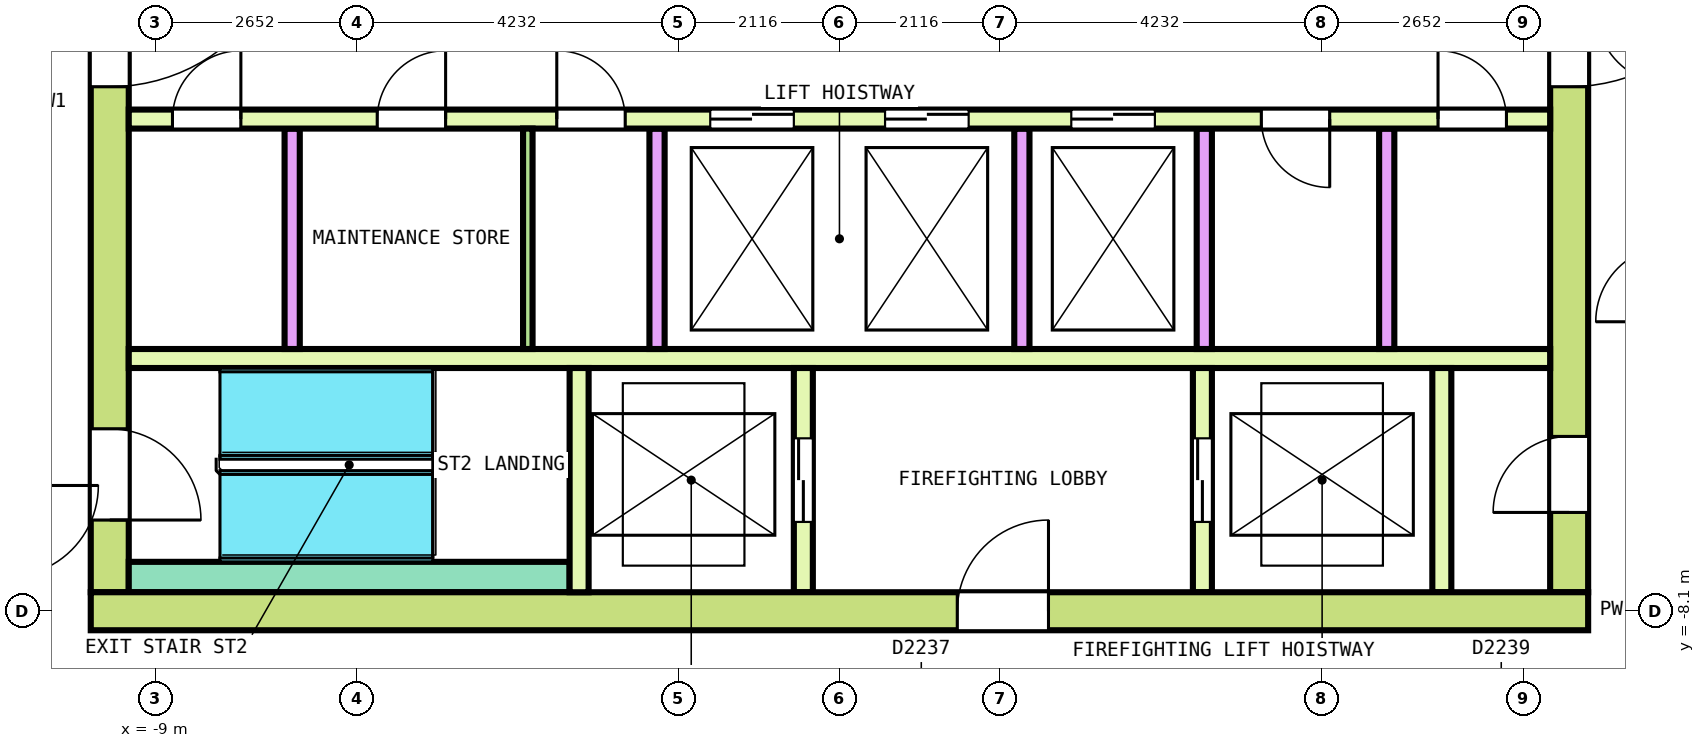
"""IFC4 building model, lengths in metres.
Left out: names, types, materials, properties, quantities, classifications, styles, units other than length and angle.
Written with IfcOpenShell. Run it as: python <this file> out.ifc"""

import sys

from ifc_helpers import new_model, si_unit, direction, frame, frame_2d, origin, place, context, subcontext, project, spatial, rectangle, extrude, element, fill, save


model = new_model("IFC4")
c1 = context("Model", 3, precision=1e-05, world=origin(), true_north=direction((0.0, 1.0)))
c2 = subcontext(c1, "Body", "Model", "MODEL_VIEW")
j1 = project(units=[si_unit("LENGTHUNIT", "METRE"), si_unit("PLANEANGLEUNIT", "RADIAN")], contexts=[c1])
p1 = place(None, origin())
s1 = spatial("IfcSite", under=j1, at=p1, CompositionType="ELEMENT")
p2 = place(p1, origin())
s2 = spatial("IfcBuilding", under=s1, at=p2, CompositionType="ELEMENT")
p3 = place(p2, frame((0.0, 0.0, 291.0)))
s3 = spatial("IfcBuildingStorey", under=s2, at=p3, CompositionType="ELEMENT", Elevation=291.0)
p4 = place(p3, frame((-9.85, -8.1, 0.0), z_axis=(0.0, 0.0, 1.0), x_axis=(1.0, 0.0, 0.0)))
e1 = element("IfcWall", 1, at=p4, inside=s3, PredefinedType="SHEAR", context=c2, shape_type="SweptSolid", body=[
    extrude(rectangle(XDim=19.7, YDim=0.5, at=frame_2d((9.85, 0.0))), origin(), (0.0, 0.0, 1.0), 3.7),
])
p5 = place(p4, frame((11.4, 0.0, 0.0)))
e2 = element("IfcOpeningElement", 2, at=p5, cuts=e1, PredefinedType="OPENING", context=c2, shape_type="SweptSolid", body=[
    extrude(rectangle(XDim=1.2, YDim=2.1, at=frame_2d((0.6, 1.05))), frame((0.0, 0.26, 0.0), z_axis=(0.0, -1.0, 0.0), x_axis=(1.0, 0.0, 0.0)), (0.0, 0.0, 1.0), 0.52),
])
p6 = place(p3, frame((-9.6, -7.85, 0.0), z_axis=(0.0, 0.0, 1.0), x_axis=(0.0, 1.0, 0.0)))
e3 = element("IfcWall", 3, at=p6, inside=s3, PredefinedType="SHEAR", context=c2, shape_type="SweptSolid", body=[
    extrude(rectangle(XDim=15.7, YDim=0.5, at=frame_2d((7.85, 0.0))), origin(), (0.0, 0.0, 1.0), 3.7),
])
p7 = place(p6, frame((6.65, 0.0, 0.0)))
e4 = element("IfcOpeningElement", 4, at=p7, cuts=e3, PredefinedType="OPENING", context=c2, shape_type="SweptSolid", body=[
    extrude(rectangle(XDim=2.4, YDim=2.1, at=frame_2d((1.2, 1.05))), frame((0.0, 0.26, 0.0), z_axis=(0.0, -1.0, 0.0), x_axis=(1.0, 0.0, 0.0)), (0.0, 0.0, 1.0), 0.52),
])
p8 = place(p6, frame((13.55, 0.0, 0.0)))
e5 = element("IfcOpeningElement", 5, at=p8, cuts=e3, PredefinedType="OPENING", context=c2, shape_type="SweptSolid", body=[
    extrude(rectangle(XDim=1.2, YDim=2.1, at=frame_2d((0.6, 1.05))), frame((0.0, 0.26, 0.0), z_axis=(0.0, -1.0, 0.0), x_axis=(1.0, 0.0, 0.0)), (0.0, 0.0, 1.0), 0.52),
])
p9 = place(p6, frame((0.95, 0.0, 0.0)))
e6 = element("IfcOpeningElement", 6, at=p9, cuts=e3, PredefinedType="OPENING", context=c2, shape_type="SweptSolid", body=[
    extrude(rectangle(XDim=1.2, YDim=2.1, at=frame_2d((0.6, 1.05))), frame((0.0, 0.26, 0.0), z_axis=(0.0, -1.0, 0.0), x_axis=(1.0, 0.0, 0.0)), (0.0, 0.0, 1.0), 0.52),
])
p10 = place(p3, frame((9.6, -7.85, 0.0), z_axis=(0.0, 0.0, 1.0), x_axis=(0.0, 1.0, 0.0)))
e7 = element("IfcWall", 7, at=p10, inside=s3, PredefinedType="SHEAR", context=c2, shape_type="SweptSolid", body=[
    extrude(rectangle(XDim=15.7, YDim=0.5, at=frame_2d((7.85, 0.0))), origin(), (0.0, 0.0, 1.0), 3.7),
])
p11 = place(p10, frame((6.65, 0.0, 0.0)))
e8 = element("IfcOpeningElement", 8, at=p11, cuts=e7, PredefinedType="OPENING", context=c2, shape_type="SweptSolid", body=[
    extrude(rectangle(XDim=2.4, YDim=2.1, at=frame_2d((1.2, 1.05))), frame((0.0, 0.26, 0.0), z_axis=(0.0, -1.0, 0.0), x_axis=(1.0, 0.0, 0.0)), (0.0, 0.0, 1.0), 0.52),
])
p12 = place(p10, frame((13.55, 0.0, 0.0)))
e9 = element("IfcOpeningElement", 9, at=p12, cuts=e7, PredefinedType="OPENING", context=c2, shape_type="SweptSolid", body=[
    extrude(rectangle(XDim=1.2, YDim=2.1, at=frame_2d((0.6, 1.05))), frame((0.0, 0.26, 0.0), z_axis=(0.0, -1.0, 0.0), x_axis=(1.0, 0.0, 0.0)), (0.0, 0.0, 1.0), 0.52),
])
p13 = place(p10, frame((1.05, 0.0, 0.0)))
e10 = element("IfcOpeningElement", 10, at=p13, cuts=e7, PredefinedType="OPENING", context=c2, shape_type="SweptSolid", body=[
    extrude(rectangle(XDim=1.0, YDim=2.1, at=frame_2d((0.5, 1.05))), frame((0.0, 0.26, 0.0), z_axis=(0.0, -1.0, 0.0), x_axis=(1.0, 0.0, 0.0)), (0.0, 0.0, 1.0), 0.52),
])
p14 = place(p3, frame((-9.35, -1.625, 0.0), z_axis=(0.0, 0.0, 1.0), x_axis=(1.0, 0.0, 0.0)))
e11 = element("IfcWall", 11, at=p14, inside=s3, PredefinedType="SOLIDWALL", context=c2, shape_type="SweptSolid", body=[
    extrude(rectangle(XDim=18.7, YDim=0.25, at=frame_2d((9.35, 0.0))), origin(), (0.0, 0.0, 1.0), 3.7),
])
p15 = place(p14, frame((7.65, 0.0, 0.0)))
e12 = element("IfcOpeningElement", 12, at=p15, cuts=e11, PredefinedType="OPENING", context=c2, shape_type="SweptSolid", body=[
    extrude(rectangle(XDim=1.1, YDim=2.1, at=frame_2d((0.55, 1.05))), frame((0.0, 0.135, 0.0), z_axis=(0.0, -1.0, 0.0), x_axis=(1.0, 0.0, 0.0)), (0.0, 0.0, 1.0), 0.27),
])
p16 = place(p14, frame((9.95, 0.0, 0.0)))
e13 = element("IfcOpeningElement", 13, at=p16, cuts=e11, PredefinedType="OPENING", context=c2, shape_type="SweptSolid", body=[
    extrude(rectangle(XDim=1.1, YDim=2.1, at=frame_2d((0.55, 1.05))), frame((0.0, 0.135, 0.0), z_axis=(0.0, -1.0, 0.0), x_axis=(1.0, 0.0, 0.0)), (0.0, 0.0, 1.0), 0.27),
])
p17 = place(p14, frame((12.4, 0.0, 0.0)))
e14 = element("IfcOpeningElement", 14, at=p17, cuts=e11, PredefinedType="OPENING", context=c2, shape_type="SweptSolid", body=[
    extrude(rectangle(XDim=1.1, YDim=2.1, at=frame_2d((0.55, 1.05))), frame((0.0, 0.135, 0.0), z_axis=(0.0, -1.0, 0.0), x_axis=(1.0, 0.0, 0.0)), (0.0, 0.0, 1.0), 0.27),
])
p18 = place(p14, frame((0.575, 0.0, 0.0)))
e15 = element("IfcOpeningElement", 15, at=p18, cuts=e11, PredefinedType="OPENING", context=c2, shape_type="SweptSolid", body=[
    extrude(rectangle(XDim=0.9, YDim=2.1, at=frame_2d((0.45, 1.05))), frame((0.0, 0.135, 0.0), z_axis=(0.0, -1.0, 0.0), x_axis=(1.0, 0.0, 0.0)), (0.0, 0.0, 1.0), 0.27),
])
p19 = place(p14, frame((3.269, 0.0, 0.0)))
e16 = element("IfcOpeningElement", 16, at=p19, cuts=e11, PredefinedType="OPENING", context=c2, shape_type="SweptSolid", body=[
    extrude(rectangle(XDim=0.9, YDim=2.1, at=frame_2d((0.45, 1.05))), frame((0.0, 0.135, 0.0), z_axis=(0.0, -1.0, 0.0), x_axis=(1.0, 0.0, 0.0)), (0.0, 0.0, 1.0), 0.27),
])
p20 = place(p14, frame((5.631, 0.0, 0.0)))
e17 = element("IfcOpeningElement", 17, at=p20, cuts=e11, PredefinedType="OPENING", context=c2, shape_type="SweptSolid", body=[
    extrude(rectangle(XDim=0.9, YDim=2.1, at=frame_2d((0.45, 1.05))), frame((0.0, 0.135, 0.0), z_axis=(0.0, -1.0, 0.0), x_axis=(1.0, 0.0, 0.0)), (0.0, 0.0, 1.0), 0.27),
])
p21 = place(p14, frame((14.9, 0.0, 0.0)))
e18 = element("IfcOpeningElement", 18, at=p21, cuts=e11, PredefinedType="OPENING", context=c2, shape_type="SweptSolid", body=[
    extrude(rectangle(XDim=0.9, YDim=2.1, at=frame_2d((0.45, 1.05))), frame((0.0, 0.135, 0.0), z_axis=(0.0, -1.0, 0.0), x_axis=(1.0, 0.0, 0.0)), (0.0, 0.0, 1.0), 0.27),
])
p22 = place(p14, frame((17.225, 0.0, 0.0)))
e19 = element("IfcOpeningElement", 19, at=p22, cuts=e11, PredefinedType="OPENING", context=c2, shape_type="SweptSolid", body=[
    extrude(rectangle(XDim=0.9, YDim=2.1, at=frame_2d((0.45, 1.05))), frame((0.0, 0.135, 0.0), z_axis=(0.0, -1.0, 0.0), x_axis=(1.0, 0.0, 0.0)), (0.0, 0.0, 1.0), 0.27),
])
p23 = place(p3, frame((-9.35, -4.775, 0.0), z_axis=(0.0, 0.0, 1.0), x_axis=(1.0, 0.0, 0.0)))
e20 = element("IfcWall", 20, at=p23, inside=s3, PredefinedType="SOLIDWALL", context=c2, shape_type="SweptSolid", body=[
    extrude(rectangle(XDim=18.7, YDim=0.25, at=frame_2d((9.35, 0.0))), origin(), (0.0, 0.0, 1.0), 3.7),
])
for number, where, z_axis, x_axis in (
    (21, (-7.2, -4.65, 0.0), (0.0, 0.0, 1.0), (0.0, 1.0, 0.0)),
    (22, (-2.4, -4.65, 0.0), (0.0, 0.0, 1.0), (0.0, 1.0, 0.0)),
    (23, (2.4, -4.65, 0.0), (0.0, 0.0, 1.0), (0.0, 1.0, 0.0)),
    (24, (4.8, -4.65, 0.0), (0.0, 0.0, 1.0), (0.0, 1.0, 0.0)),
    (25, (7.2, -4.65, 0.0), (0.0, 0.0, 1.0), (0.0, 1.0, 0.0)),
):
    element("IfcWall", number, at=place(p3, frame(where, z_axis=z_axis, x_axis=x_axis)), inside=s3, PredefinedType="SOLIDWALL", context=c2, shape_type="SweptSolid", body=[
        extrude(rectangle(XDim=2.9, YDim=0.2, at=frame_2d((1.45, 0.0))), origin(), (0.0, 0.0, 1.0), 3.7),
    ])
p24 = place(p3, frame((-9.35, -7.65, 0.0), z_axis=(0.0, 0.0, 1.0), x_axis=(1.0, 0.0, 0.0)))
e26 = element("IfcWall", 26, at=p24, inside=s3, PredefinedType="SOLIDWALL", context=c2, shape_type="SweptSolid", body=[
    extrude(rectangle(XDim=5.8, YDim=0.4, at=frame_2d((2.9, 0.0))), origin(), (0.0, 0.0, 1.0), 3.7),
])
p25 = place(p3, frame((-3.425, -7.85, 0.0), z_axis=(0.0, 0.0, 1.0), x_axis=(0.0, 1.0, 0.0)))
e27 = element("IfcWall", 27, at=p25, inside=s3, PredefinedType="SOLIDWALL", context=c2, shape_type="SweptSolid", body=[
    extrude(rectangle(XDim=2.95, YDim=0.25, at=frame_2d((1.475, 0.0))), origin(), (0.0, 0.0, 1.0), 3.7),
])
p26 = place(p3, frame((-0.475, -7.85, 0.0), z_axis=(0.0, 0.0, 1.0), x_axis=(0.0, 1.0, 0.0)))
e28 = element("IfcWall", 28, at=p26, inside=s3, PredefinedType="SOLIDWALL", context=c2, shape_type="SweptSolid", body=[
    extrude(rectangle(XDim=2.95, YDim=0.25, at=frame_2d((1.475, 0.0))), origin(), (0.0, 0.0, 1.0), 3.7),
])
p27 = place(p26, frame((0.925, 0.0, 0.0)))
e29 = element("IfcOpeningElement", 29, at=p27, cuts=e28, PredefinedType="OPENING", context=c2, shape_type="SweptSolid", body=[
    extrude(rectangle(XDim=1.1, YDim=2.1, at=frame_2d((0.55, 1.05))), frame((0.0, 0.135, 0.0), z_axis=(0.0, -1.0, 0.0), x_axis=(1.0, 0.0, 0.0)), (0.0, 0.0, 1.0), 0.27),
])
p28 = place(p3, frame((4.775, -7.85, 0.0), z_axis=(0.0, 0.0, 1.0), x_axis=(0.0, 1.0, 0.0)))
e30 = element("IfcWall", 30, at=p28, inside=s3, PredefinedType="SOLIDWALL", context=c2, shape_type="SweptSolid", body=[
    extrude(rectangle(XDim=2.95, YDim=0.25, at=frame_2d((1.475, 0.0))), origin(), (0.0, 0.0, 1.0), 3.7),
])
p29 = place(p28, frame((0.925, 0.0, 0.0)))
e31 = element("IfcOpeningElement", 31, at=p29, cuts=e30, PredefinedType="OPENING", context=c2, shape_type="SweptSolid", body=[
    extrude(rectangle(XDim=1.1, YDim=2.1, at=frame_2d((0.55, 1.05))), frame((0.0, 0.135, 0.0), z_axis=(0.0, -1.0, 0.0), x_axis=(1.0, 0.0, 0.0)), (0.0, 0.0, 1.0), 0.27),
])
p30 = place(p3, frame((7.925, -7.85, 0.0), z_axis=(0.0, 0.0, 1.0), x_axis=(0.0, 1.0, 0.0)))
e32 = element("IfcWall", 32, at=p30, inside=s3, PredefinedType="SOLIDWALL", context=c2, shape_type="SweptSolid", body=[
    extrude(rectangle(XDim=2.95, YDim=0.25, at=frame_2d((1.475, 0.0))), origin(), (0.0, 0.0, 1.0), 3.7),
])
p31 = place(p3, frame((-4.1, -4.65, 0.0), z_axis=(0.0, 0.0, 1.0), x_axis=(0.0, 1.0, 0.0)))
e33 = element("IfcWall", 33, at=p31, inside=s3, PredefinedType="PARTITIONING", context=c2, shape_type="SweptSolid", body=[
    extrude(rectangle(XDim=2.9, YDim=0.125, at=frame_2d((1.45, 0.0))), origin(), (0.0, 0.0, 1.0), 3.7),
])
p32 = place(p15, origin())
e34 = element("IfcDoor", 34, at=p32, inside=s3, OperationType="DOUBLE_DOOR_SLIDING", PredefinedType="DOOR", context=c2, shape_type="SweptSolid", body=[
    extrude(rectangle(XDim=1.1, YDim=2.1, at=frame_2d((0.55, 1.05))), frame((0.0, 0.075, 0.0), z_axis=(0.0, -1.0, 0.0), x_axis=(1.0, 0.0, 0.0)), (0.0, 0.0, 1.0), 0.15),
])
fill(e12, e34)
p33 = place(p16, origin())
e35 = element("IfcDoor", 35, at=p33, inside=s3, OperationType="DOUBLE_DOOR_SLIDING", PredefinedType="DOOR", context=c2, shape_type="SweptSolid", body=[
    extrude(rectangle(XDim=1.1, YDim=2.1, at=frame_2d((0.55, 1.05))), frame((0.0, 0.075, 0.0), z_axis=(0.0, -1.0, 0.0), x_axis=(1.0, 0.0, 0.0)), (0.0, 0.0, 1.0), 0.15),
])
fill(e13, e35)
p34 = place(p17, origin())
e36 = element("IfcDoor", 36, at=p34, inside=s3, OperationType="DOUBLE_DOOR_SLIDING", PredefinedType="DOOR", context=c2, shape_type="SweptSolid", body=[
    extrude(rectangle(XDim=1.1, YDim=2.1, at=frame_2d((0.55, 1.05))), frame((0.0, 0.075, 0.0), z_axis=(0.0, -1.0, 0.0), x_axis=(1.0, 0.0, 0.0)), (0.0, 0.0, 1.0), 0.15),
])
fill(e14, e36)
p35 = place(p27, origin())
e37 = element("IfcDoor", 37, at=p35, inside=s3, OperationType="DOUBLE_DOOR_SLIDING", PredefinedType="DOOR", context=c2, shape_type="SweptSolid", body=[
    extrude(rectangle(XDim=1.1, YDim=2.1, at=frame_2d((0.55, 1.05))), frame((0.0, 0.075, 0.0), z_axis=(0.0, -1.0, 0.0), x_axis=(1.0, 0.0, 0.0)), (0.0, 0.0, 1.0), 0.15),
])
fill(e29, e37)
p36 = place(p29, origin())
e38 = element("IfcDoor", 38, at=p36, inside=s3, OperationType="DOUBLE_DOOR_SLIDING", PredefinedType="DOOR", context=c2, shape_type="SweptSolid", body=[
    extrude(rectangle(XDim=1.1, YDim=2.1, at=frame_2d((0.55, 1.05))), frame((0.0, 0.075, 0.0), z_axis=(0.0, -1.0, 0.0), x_axis=(1.0, 0.0, 0.0)), (0.0, 0.0, 1.0), 0.15),
])
fill(e31, e38)
p37 = place(p7, origin())
e39 = element("IfcDoor", 39, at=p37, inside=s3, OperationType="DOUBLE_DOOR_SINGLE_SWING", PredefinedType="DOOR", context=c2, shape_type="SweptSolid", body=[
    extrude(rectangle(XDim=2.4, YDim=2.1, at=frame_2d((1.2, 1.05))), frame((0.0, 0.2, 0.0), z_axis=(0.0, -1.0, 0.0), x_axis=(1.0, 0.0, 0.0)), (0.0, 0.0, 1.0), 0.4),
])
fill(e4, e39)
p38 = place(p11, origin())
e40 = element("IfcDoor", 40, at=p38, inside=s3, OperationType="DOUBLE_DOOR_SINGLE_SWING", PredefinedType="DOOR", context=c2, shape_type="SweptSolid", body=[
    extrude(rectangle(XDim=2.4, YDim=2.1, at=frame_2d((1.2, 1.05))), frame((0.0, 0.2, 0.0), z_axis=(0.0, -1.0, 0.0), x_axis=(1.0, 0.0, 0.0)), (0.0, 0.0, 1.0), 0.4),
])
fill(e8, e40)
p39 = place(p9, origin())
e41 = element("IfcDoor", 41, at=p39, inside=s3, OperationType="SINGLE_SWING_RIGHT", PredefinedType="DOOR", context=c2, shape_type="SweptSolid", body=[
    extrude(rectangle(XDim=1.2, YDim=2.1, at=frame_2d((0.6, 1.05))), frame((0.0, 0.2, 0.0), z_axis=(0.0, -1.0, 0.0), x_axis=(1.0, 0.0, 0.0)), (0.0, 0.0, 1.0), 0.4),
])
fill(e6, e41)
p40 = place(p5, origin())
e42 = element("IfcDoor", 42, at=p40, inside=s3, OperationType="SINGLE_SWING_RIGHT", PredefinedType="DOOR", context=c2, shape_type="SweptSolid", body=[
    extrude(rectangle(XDim=1.2, YDim=2.1, at=frame_2d((0.6, 1.05))), frame((0.0, 0.2, 0.0), z_axis=(0.0, -1.0, 0.0), x_axis=(1.0, 0.0, 0.0)), (0.0, 0.0, 1.0), 0.4),
])
fill(e2, e42)
p41 = place(p13, origin())
e43 = element("IfcDoor", 43, at=p41, inside=s3, OperationType="SINGLE_SWING_RIGHT", PredefinedType="DOOR", context=c2, shape_type="SweptSolid", body=[
    extrude(rectangle(XDim=1.0, YDim=2.1, at=frame_2d((0.5, 1.05))), frame((0.0, 0.2, 0.0), z_axis=(0.0, -1.0, 0.0), x_axis=(1.0, 0.0, 0.0)), (0.0, 0.0, 1.0), 0.4),
])
fill(e10, e43)
p42 = place(p18, origin())
e44 = element("IfcDoor", 44, at=p42, inside=s3, OperationType="SINGLE_SWING_LEFT", PredefinedType="DOOR", context=c2, shape_type="SweptSolid", body=[
    extrude(rectangle(XDim=0.9, YDim=2.1, at=frame_2d((0.45, 1.05))), frame((0.0, 0.075, 0.0), z_axis=(0.0, -1.0, 0.0), x_axis=(1.0, 0.0, 0.0)), (0.0, 0.0, 1.0), 0.15),
])
fill(e15, e44)
p43 = place(p19, origin())
e45 = element("IfcDoor", 45, at=p43, inside=s3, OperationType="SINGLE_SWING_RIGHT", PredefinedType="DOOR", context=c2, shape_type="SweptSolid", body=[
    extrude(rectangle(XDim=0.9, YDim=2.1, at=frame_2d((0.45, 1.05))), frame((0.0, 0.075, 0.0), z_axis=(0.0, -1.0, 0.0), x_axis=(1.0, 0.0, 0.0)), (0.0, 0.0, 1.0), 0.15),
])
fill(e16, e45)
p44 = place(p20, origin())
e46 = element("IfcDoor", 46, at=p44, inside=s3, OperationType="SINGLE_SWING_LEFT", PredefinedType="DOOR", context=c2, shape_type="SweptSolid", body=[
    extrude(rectangle(XDim=0.9, YDim=2.1, at=frame_2d((0.45, 1.05))), frame((0.0, 0.075, 0.0), z_axis=(0.0, -1.0, 0.0), x_axis=(1.0, 0.0, 0.0)), (0.0, 0.0, 1.0), 0.15),
])
fill(e17, e46)
p45 = place(p21, origin())
e47 = element("IfcDoor", 47, at=p45, inside=s3, OperationType="SINGLE_SWING_RIGHT", PredefinedType="DOOR", context=c2, shape_type="SweptSolid", body=[
    extrude(rectangle(XDim=0.9, YDim=2.1, at=frame_2d((0.45, 1.05))), frame((0.0, 0.075, 0.0), z_axis=(0.0, -1.0, 0.0), x_axis=(1.0, 0.0, 0.0)), (0.0, 0.0, 1.0), 0.15),
])
fill(e18, e47)
p46 = place(p22, origin())
e48 = element("IfcDoor", 48, at=p46, inside=s3, OperationType="SINGLE_SWING_LEFT", PredefinedType="DOOR", context=c2, shape_type="SweptSolid", body=[
    extrude(rectangle(XDim=0.9, YDim=2.1, at=frame_2d((0.45, 1.05))), frame((0.0, 0.075, 0.0), z_axis=(0.0, -1.0, 0.0), x_axis=(1.0, 0.0, 0.0)), (0.0, 0.0, 1.0), 0.15),
])
fill(e19, e48)
save(model, sys.argv[1])
